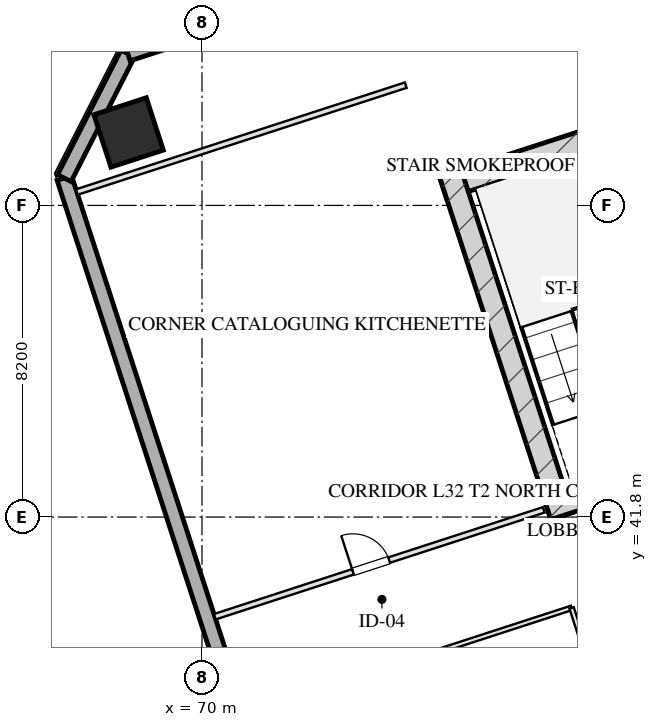
"""IFC4 building model, lengths in metres.
Left out: names, types, materials, properties, quantities, classifications, styles, units other than length and angle.
Written with IfcOpenShell. Run it as: python <this file> out.ifc"""

import sys

from ifc_helpers import new_model, si_unit, direction, frame, frame_2d, origin, origin_2d, place, context, subcontext, project, spatial, rectangle, hollow_rectangle, extrude, element, fill, save


model = new_model("IFC4")
c1 = context("Model", 3, precision=1e-05, world=origin(), true_north=direction((0.0, 1.0)))
c2 = subcontext(c1, "Body", "Model", "MODEL_VIEW")
j1 = project(units=[si_unit("LENGTHUNIT", "METRE"), si_unit("PLANEANGLEUNIT", "RADIAN")], contexts=[c1])
p1 = place(None, origin())
s1 = spatial("IfcSite", under=j1, at=p1, CompositionType="ELEMENT")
p2 = place(p1, origin())
s2 = spatial("IfcBuilding", under=s1, at=p2, CompositionType="ELEMENT")
p3 = place(p2, frame((0.0, 0.0, 124.2)))
s3 = spatial("IfcBuildingStorey", under=s2, at=p3, CompositionType="ELEMENT", Elevation=124.2)
p4 = place(p3, frame((76.344, 50.466, 0.0), z_axis=(0.0, 0.0, 1.0), x_axis=(0.951055727519, 0.309019421968, 0.0)))
e1 = element("IfcWall", 1, at=p4, inside=s3, PredefinedType="SHEAR", context=c2, shape_type="SweptSolid", body=[
    extrude(rectangle(XDim=16.4, YDim=0.6, at=frame_2d((8.2, 0.0))), origin(), (0.0, 0.0, 1.0), 3.45),
])
p5 = place(p3, frame((79.466, 41.828, 0.0), z_axis=(0.0, 0.0, 1.0), x_axis=(-0.309041232772, 0.951048640421, 0.0)))
e2 = element("IfcWall", 2, at=p5, inside=s3, PredefinedType="SHEAR", context=c2, shape_type="SweptSolid", body=[
    extrude(rectangle(XDim=9.48, YDim=0.6, at=frame_2d((4.74, 0.0))), origin(), (0.0, 0.0, 1.0), 3.45),
])
p6 = place(p3, frame((79.087, 42.021, 0.0), z_axis=(0.0, 0.0, 1.0), x_axis=(0.951062550203, 0.3089984233, 0.0)))
e3 = element("IfcWall", 3, at=p6, inside=s3, PredefinedType="SHEAR", context=c2, shape_type="SweptSolid", body=[
    extrude(rectangle(XDim=4.22, YDim=0.6, at=frame_2d((2.11, 0.0))), origin(), (0.0, 0.0, 1.0), 3.45),
])
p7 = place(p3, frame((68.069, 51.92, 0.0), z_axis=(0.0, 0.0, 1.0), x_axis=(0.951056516295, 0.309016994375, 0.0)))
e4 = element("IfcColumn", 4, at=p7, inside=s3, PredefinedType="COLUMN", context=c2, shape_type="SweptSolid", body=[
    extrude(hollow_rectangle(XDim=1.45, YDim=1.45, WallThickness=0.05, at=origin_2d()), origin(), (0.0, 0.0, 1.0), 3.451),
])
p8 = place(p3, frame((80.716, 6.59, 0.0), z_axis=(0.0, 0.0, 1.0), x_axis=(-0.309017542002, 0.95105633836, 0.0)))
e5 = element("IfcWall", 5, at=p8, inside=s3, PredefinedType="SOLIDWALL", context=c2, shape_type="SweptSolid", body=[
    extrude(rectangle(XDim=46.4, YDim=0.4, at=frame_2d((23.2, 0.0))), origin(), (0.0, 0.0, 1.0), 2.61),
])
p9 = place(p8, frame((28.4, 0.0, 0.75)))
e6 = element("IfcOpeningElement", 6, at=p9, cuts=e5, PredefinedType="OPENING", context=c2, shape_type="SweptSolid", body=[
    extrude(rectangle(XDim=2.4, YDim=1.46, at=frame_2d((1.2, 0.73))), frame((0.0, 0.21, 0.0), z_axis=(0.0, -1.0, 0.0), x_axis=(1.0, 0.0, 0.0)), (0.0, 0.0, 1.0), 0.42),
])
p10 = place(p8, frame((18.25, 0.0, 0.0)))
e7 = element("IfcOpeningElement", 7, at=p10, cuts=e5, PredefinedType="OPENING", context=c2, shape_type="SweptSolid", body=[
    extrude(rectangle(XDim=1.1, YDim=2.15, at=frame_2d((0.55, 1.075))), frame((0.0, 0.21, 0.0), z_axis=(0.0, -1.0, 0.0), x_axis=(1.0, 0.0, 0.0)), (0.0, 0.0, 1.0), 0.42),
])
p11 = place(p3, frame((66.377, 50.719, 0.0), z_axis=(0.0, 0.0, 1.0), x_axis=(0.454026238093, 0.890988313685, 0.0)))
e8 = element("IfcWall", 8, at=p11, inside=s3, PredefinedType="SOLIDWALL", context=c2, shape_type="SweptSolid", body=[
    extrude(rectangle(XDim=3.677, YDim=0.4, at=frame_2d((1.838, 0.0))), origin(), (0.0, 0.0, 1.0), 2.61),
])
p12 = place(p3, frame((68.047, 53.995, 0.0), z_axis=(0.0, 0.0, 1.0), x_axis=(0.95105505922, 0.309021478754, 0.0)))
e9 = element("IfcWall", 9, at=p12, inside=s3, PredefinedType="SOLIDWALL", context=c2, shape_type="SweptSolid", body=[
    extrude(rectangle(XDim=29.4, YDim=0.4, at=frame_2d((14.7, 0.0))), origin(), (0.0, 0.0, 1.0), 2.61),
])
p13 = place(p3, frame((66.707, 50.352, 0.0), z_axis=(0.0, 0.0, 1.0), x_axis=(0.951057133767, 0.309015093986, 0.0)))
e10 = element("IfcWall", 10, at=p13, inside=s3, PredefinedType="PARTITIONING", context=c2, shape_type="SweptSolid", body=[
    extrude(rectangle(XDim=9.1, YDim=0.15, at=frame_2d((4.55, 0.0))), origin(), (0.0, 0.0, 1.0), 3.175),
])
p14 = place(p3, frame((70.338, 39.177, 0.0), z_axis=(0.0, 0.0, 1.0), x_axis=(0.951059695568, 0.309007209409, 0.0)))
e11 = element("IfcWall", 11, at=p14, inside=s3, PredefinedType="PARTITIONING", context=c2, shape_type="SweptSolid", body=[
    extrude(rectangle(XDim=9.1, YDim=0.15, at=frame_2d((4.55, 0.0))), origin(), (0.0, 0.0, 1.0), 3.175),
])
p15 = place(p14, frame((3.822, 0.0, 0.0)))
e12 = element("IfcOpeningElement", 12, at=p15, cuts=e11, PredefinedType="OPENING", context=c2, shape_type="SweptSolid", body=[
    extrude(rectangle(XDim=1.0, YDim=2.05, at=frame_2d((0.5, 1.025))), frame((0.0, 0.085, 0.0), z_axis=(0.0, -1.0, 0.0), x_axis=(1.0, 0.0, 0.0)), (0.0, 0.0, 1.0), 0.17),
])
p16 = place(p3, frame((71.166, 36.629, 0.0), z_axis=(0.0, 0.0, 1.0), x_axis=(0.951059383421, 0.309008170129, 0.0)))
e13 = element("IfcWall", 13, at=p16, inside=s3, PredefinedType="PARTITIONING", context=c2, shape_type="SweptSolid", body=[
    extrude(rectangle(XDim=9.0, YDim=0.12, at=frame_2d((4.5, 0.0))), origin(), (0.0, 0.0, 1.0), 3.175),
])
p17 = place(p3, frame((84.867, 23.584, 0.0), z_axis=(0.0, 0.0, 1.0), x_axis=(-0.309022042254, 0.951054876125, 0.0)))
e14 = element("IfcWall", 14, at=p17, inside=s3, PredefinedType="PARTITIONING", context=c2, shape_type="SweptSolid", body=[
    extrude(rectangle(XDim=16.64, YDim=0.12, at=frame_2d((8.32, 0.0))), origin(), (0.0, 0.0, 1.0), 3.175),
])
p18 = place(p17, frame((3.06, 0.0, 0.0)))
e15 = element("IfcOpeningElement", 15, at=p18, cuts=e14, PredefinedType="OPENING", context=c2, shape_type="SweptSolid", body=[
    extrude(rectangle(XDim=1.0, YDim=2.05, at=frame_2d((0.5, 1.025))), frame((0.0, 0.07, 0.0), z_axis=(0.0, -1.0, 0.0), x_axis=(1.0, 0.0, 0.0)), (0.0, 0.0, 1.0), 0.14),
])
p19 = place(p17, frame((9.22, 0.0, 0.0)))
e16 = element("IfcOpeningElement", 16, at=p19, cuts=e14, PredefinedType="OPENING", context=c2, shape_type="SweptSolid", body=[
    extrude(rectangle(XDim=1.0, YDim=2.05, at=frame_2d((0.5, 1.025))), frame((0.0, 0.07, 0.0), z_axis=(0.0, -1.0, 0.0), x_axis=(1.0, 0.0, 0.0)), (0.0, 0.0, 1.0), 0.14),
])
p20 = place(p17, frame((13.98, 0.0, 0.0)))
e17 = element("IfcOpeningElement", 17, at=p20, cuts=e14, PredefinedType="OPENING", context=c2, shape_type="SweptSolid", body=[
    extrude(rectangle(XDim=1.0, YDim=2.05, at=frame_2d((0.5, 1.025))), frame((0.0, 0.07, 0.0), z_axis=(0.0, -1.0, 0.0), x_axis=(1.0, 0.0, 0.0)), (0.0, 0.0, 1.0), 0.14),
])
p21 = place(p15, origin())
e18 = element("IfcDoor", 18, at=p21, inside=s3, OperationType="SINGLE_SWING_LEFT", PredefinedType="DOOR", context=c2, shape_type="SweptSolid", body=[
    extrude(rectangle(XDim=1.0, YDim=2.05, at=frame_2d((0.5, 1.025))), frame((0.0, 0.025, 0.0), z_axis=(0.0, -1.0, 0.0), x_axis=(1.0, 0.0, 0.0)), (0.0, 0.0, 1.0), 0.05),
])
fill(e12, e18)
save(model, sys.argv[1])
